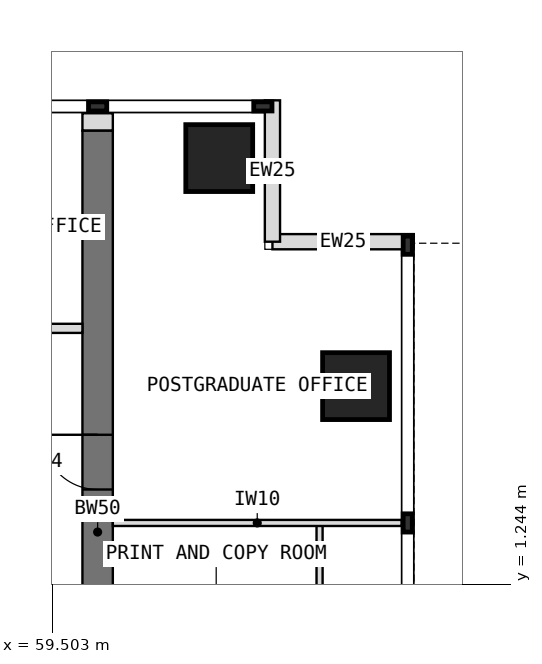
"""IFC4 building model, lengths in metres.
Left out: names, types, materials, properties, quantities, classifications, styles, units other than length and angle.
Written with IfcOpenShell. Run it as: python <this file> out.ifc"""

import sys

from ifc_helpers import new_model, si_unit, direction, frame, frame_2d, origin, origin_2d, place, context, subcontext, project, spatial, rectangle, extrude, element, fill, save


model = new_model("IFC4")
c1 = context("Model", 3, precision=1e-05, world=origin(), true_north=direction((0.0, 1.0)))
c2 = subcontext(c1, "Body", "Model", "MODEL_VIEW")
j1 = project(units=[si_unit("LENGTHUNIT", "METRE"), si_unit("PLANEANGLEUNIT", "RADIAN")], contexts=[c1])
p1 = place(None, origin())
s1 = spatial("IfcSite", under=j1, at=p1, CompositionType="ELEMENT")
p2 = place(p1, origin())
s2 = spatial("IfcBuilding", under=s1, at=p2, CompositionType="ELEMENT")
p3 = place(p2, frame((0.0, 0.0, 230.5)))
s3 = spatial("IfcBuildingStorey", under=s2, at=p3, CompositionType="ELEMENT", Elevation=230.5)
p4 = place(p3, frame((60.25, -4.5, 0.0), z_axis=(0.0, 0.0, 1.0), x_axis=(0.0, 1.0, 0.0)))
e1 = element("IfcWall", 1, at=p4, inside=s3, PredefinedType="SHEAR", context=c2, shape_type="SweptSolid", body=[
    extrude(rectangle(XDim=13.2, YDim=0.5, at=frame_2d((6.6, 0.0))), origin(), (0.0, 0.0, 1.0), 4.0),
])
p5 = place(p4, frame((0.55, 0.0, 0.0)))
e2 = element("IfcOpeningElement", 2, at=p5, cuts=e1, PredefinedType="OPENING", context=c2, shape_type="SweptSolid", body=[
    extrude(rectangle(XDim=0.9, YDim=2.1, at=frame_2d((0.45, 1.05))), frame((0.0, 0.26, 0.0), z_axis=(0.0, -1.0, 0.0), x_axis=(1.0, 0.0, 0.0)), (0.0, 0.0, 1.0), 0.52),
])
p6 = place(p4, frame((2.8, 0.0, 0.0)))
e3 = element("IfcOpeningElement", 3, at=p6, cuts=e1, PredefinedType="OPENING", context=c2, shape_type="SweptSolid", body=[
    extrude(rectangle(XDim=0.9, YDim=2.1, at=frame_2d((0.45, 1.05))), frame((0.0, 0.26, 0.0), z_axis=(0.0, -1.0, 0.0), x_axis=(1.0, 0.0, 0.0)), (0.0, 0.0, 1.0), 0.52),
])
p7 = place(p4, frame((7.3, 0.0, 0.0)))
e4 = element("IfcOpeningElement", 4, at=p7, cuts=e1, PredefinedType="OPENING", context=c2, shape_type="SweptSolid", body=[
    extrude(rectangle(XDim=0.9, YDim=2.1, at=frame_2d((0.45, 1.05))), frame((0.0, 0.26, 0.0), z_axis=(0.0, -1.0, 0.0), x_axis=(1.0, 0.0, 0.0)), (0.0, 0.0, 1.0), 0.52),
])
for number, where, z_axis, x_axis in (
    (5, (64.5, 4.5, 0.0), (0.0, 0.0, 1.0), (1.0, 0.0, 0.0)),
    (6, (62.25, 8.25, 0.0), (0.0, 0.0, 1.0), (1.0, 0.0, 0.0)),
):
    element("IfcColumn", number, at=place(p3, frame(where, z_axis=z_axis, x_axis=x_axis)), inside=s3, PredefinedType="COLUMN", context=c2, shape_type="SweptSolid", body=[
        extrude(rectangle(XDim=1.1, YDim=1.1, at=origin_2d()), origin(), (0.0, 0.0, 1.0), 4.0),
    ])
for number, where, z_axis, x_axis in (
    (7, (65.45, 6.875, 0.0), (0.0, 0.0, 1.0), (-1.0, 0.0, 0.0)),
    (8, (63.125, 6.875, 0.0), (0.0, 0.0, 1.0), (0.0, 1.0, 0.0)),
):
    element("IfcWall", number, at=place(p3, frame(where, z_axis=z_axis, x_axis=x_axis)), inside=s3, PredefinedType="STANDARD", context=c2, shape_type="SweptSolid", body=[
        extrude(rectangle(XDim=2.325, YDim=0.25, at=frame_2d((1.163, 0.0))), origin(), (0.0, 0.0, 1.0), 3.8),
    ])
p8 = place(p3, frame((60.25, 8.7, 0.0), z_axis=(0.0, 0.0, 1.0), x_axis=(0.0, 1.0, 0.0)))
e9 = element("IfcWall", 9, at=p8, inside=s3, PredefinedType="PARTITIONING", context=c2, shape_type="SweptSolid", body=[
    extrude(rectangle(XDim=0.288, YDim=0.5, at=frame_2d((0.144, 0.0))), origin(), (0.0, 0.0, 1.0), 3.8),
])
p9 = place(p3, frame((60.5, 2.25, 0.0), z_axis=(0.0, 0.0, 1.0), x_axis=(1.0, 0.0, 0.0)))
e10 = element("IfcWall", 10, at=p9, inside=s3, PredefinedType="PARTITIONING", context=c2, shape_type="SweptSolid", body=[
    extrude(rectangle(XDim=4.75, YDim=0.1, at=frame_2d((2.375, 0.0))), origin(), (0.0, 0.0, 1.0), 3.8),
])
p10 = place(p3, frame((63.9, -0.15, 0.0), z_axis=(0.0, 0.0, 1.0), x_axis=(0.0, 1.0, 0.0)))
e11 = element("IfcWall", 11, at=p10, inside=s3, PredefinedType="PARTITIONING", context=c2, shape_type="SweptSolid", body=[
    extrude(rectangle(XDim=2.4, YDim=0.1, at=frame_2d((1.2, 0.0))), origin(), (0.0, 0.0, 1.0), 3.8),
])
p11 = place(p3, frame((60.0, 5.45, 0.0), z_axis=(0.0, 0.0, 1.0), x_axis=(-1.0, 0.0, 0.0)))
e12 = element("IfcWall", 12, at=p11, inside=s3, PredefinedType="PARTITIONING", context=c2, shape_type="SweptSolid", body=[
    extrude(rectangle(XDim=3.0, YDim=0.15, at=frame_2d((1.5, 0.0))), origin(), (0.0, 0.0, 1.0), 3.8),
])
p12 = place(p11, frame((1.0, 0.0, 0.0)))
e13 = element("IfcOpeningElement", 13, at=p12, cuts=e12, PredefinedType="OPENING", context=c2, shape_type="SweptSolid", body=[
    extrude(rectangle(XDim=1.0, YDim=2.1, at=frame_2d((0.5, 1.05))), frame((0.0, 0.085, 0.0), z_axis=(0.0, -1.0, 0.0), x_axis=(1.0, 0.0, 0.0)), (0.0, 0.0, 1.0), 0.17),
])
p13 = place(p7, origin())
e14 = element("IfcDoor", 14, at=p13, inside=s3, OperationType="SINGLE_SWING_RIGHT", PredefinedType="DOOR", context=c2, shape_type="SweptSolid", body=[
    extrude(rectangle(XDim=0.9, YDim=2.1, at=frame_2d((0.45, 1.05))), frame((0.0, 0.025, 0.0), z_axis=(0.0, -1.0, 0.0), x_axis=(1.0, 0.0, 0.0)), (0.0, 0.0, 1.0), 0.05),
])
fill(e4, e14)
save(model, sys.argv[1])
